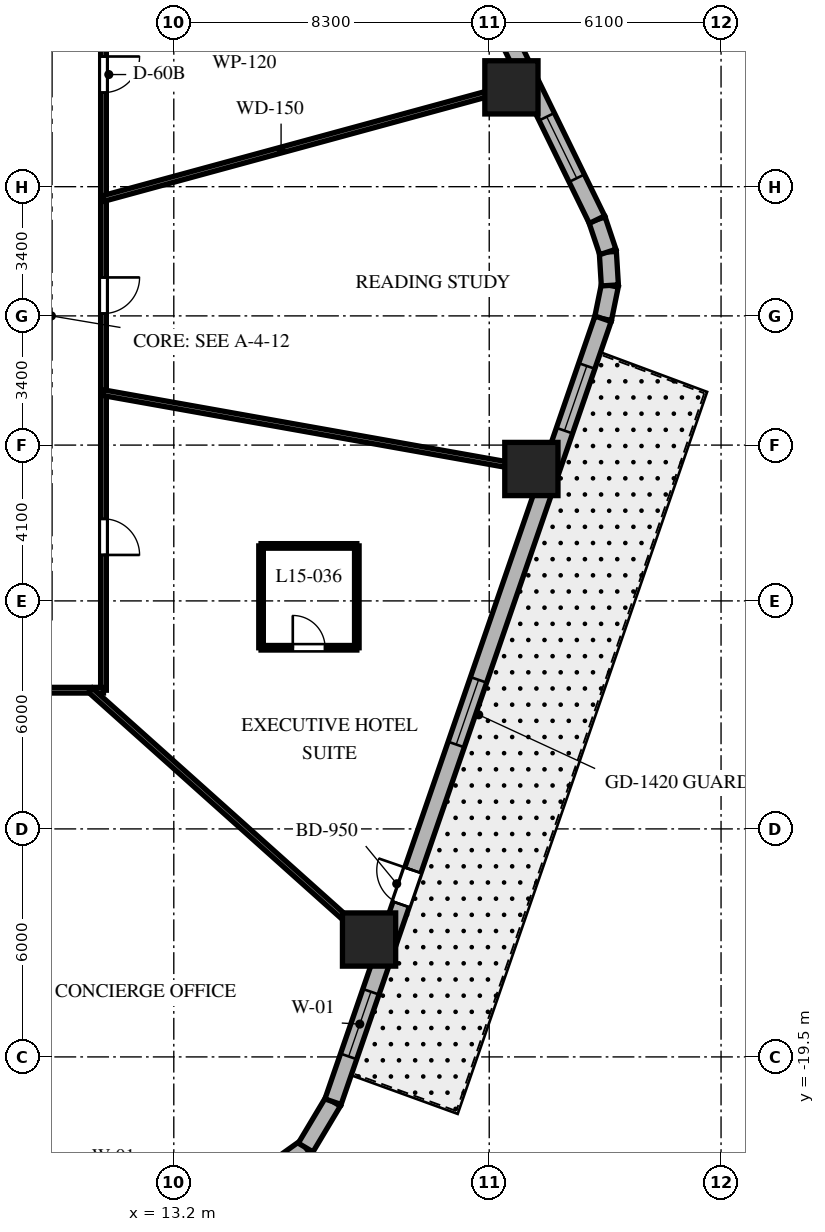
"""IFC4 building model, lengths in metres.
Left out: names, types, materials, properties, quantities, classifications, styles, units other than length and angle.
Written with IfcOpenShell. Run it as: python <this file> out.ifc"""

import sys

from ifc_helpers import new_model, si_unit, direction, frame, frame_2d, origin, origin_2d, place, context, subcontext, project, spatial, rectangle, extrude, element, fill, save


model = new_model("IFC4")
c1 = context("Model", 3, precision=1e-05, world=origin(), true_north=direction((0.0, 1.0)))
c2 = subcontext(c1, "Body", "Model", "MODEL_VIEW")
j1 = project(units=[si_unit("LENGTHUNIT", "METRE"), si_unit("PLANEANGLEUNIT", "RADIAN")], contexts=[c1])
p1 = place(None, origin())
s1 = spatial("IfcSite", under=j1, at=p1, CompositionType="ELEMENT")
p2 = place(p1, origin())
s2 = spatial("IfcBuilding", under=s1, at=p2, CompositionType="ELEMENT")
p3 = place(p2, frame((0.0, 0.0, 67.5)))
s3 = spatial("IfcBuildingStorey", under=s2, at=p3, CompositionType="ELEMENT", Elevation=67.5)
for number, where, z_axis, x_axis in (
    (1, (18.338, -16.411, 0.0), (0.0, 0.0, 1.0), (1.0, 0.0, 0.0)),
    (2, (22.609, -4.029, 0.0), (0.0, 0.0, 1.0), (1.0, 0.0, 0.0)),
    (3, (22.084, 6.014, 0.0), (0.0, 0.0, 1.0), (1.0, 0.0, 0.0)),
):
    element("IfcColumn", number, at=place(p3, frame(where, z_axis=z_axis, x_axis=x_axis)), inside=s3, PredefinedType="COLUMN", context=c2, shape_type="SweptSolid", body=[
        extrude(rectangle(XDim=1.4, YDim=1.4, at=origin_2d()), origin(), (0.0, 0.0, 1.0), 3.7),
    ])
p4 = place(p3, frame((15.544, -22.687, 0.0), z_axis=(0.0, 0.0, 1.0), x_axis=(0.814210854316, 0.580569276412, 0.0)))
e4 = element("IfcWall", 4, at=p4, inside=s3, PredefinedType="SOLIDWALL", context=c2, shape_type="SweptSolid", body=[
    extrude(rectangle(XDim=1.381, YDim=0.45, at=frame_2d((0.691, 0.0))), origin(), (0.0, 0.0, 1.0), 3.4),
])
p5 = place(p3, frame((16.669, -21.885, 0.0), z_axis=(0.0, 0.0, 1.0), x_axis=(0.512936712947, 0.858426425799, 0.0)))
e5 = element("IfcWall", 5, at=p5, inside=s3, PredefinedType="SOLIDWALL", context=c2, shape_type="SweptSolid", body=[
    extrude(rectangle(XDim=1.406, YDim=0.45, at=frame_2d((0.703, 0.0))), origin(), (0.0, 0.0, 1.0), 3.4),
])
p6 = place(p3, frame((24.496, -0.077, 0.0), z_axis=(0.0, 0.0, 1.0), x_axis=(0.199570594521, 0.979883451132, 0.0)))
e6 = element("IfcWall", 6, at=p6, inside=s3, PredefinedType="SOLIDWALL", context=c2, shape_type="SweptSolid", body=[
    extrude(rectangle(XDim=0.897, YDim=0.45, at=frame_2d((0.448, 0.0))), origin(), (0.0, 0.0, 1.0), 3.4),
])
p7 = place(p3, frame((24.675, 0.802, 0.0), z_axis=(0.0, 0.0, 1.0), x_axis=(-0.061188874166, 0.998126205286, 0.0)))
e7 = element("IfcWall", 7, at=p7, inside=s3, PredefinedType="SOLIDWALL", context=c2, shape_type="SweptSolid", body=[
    extrude(rectangle(XDim=0.882, YDim=0.45, at=frame_2d((0.441, 0.0))), origin(), (0.0, 0.0, 1.0), 3.4),
])
p8 = place(p3, frame((24.621, 1.682, 0.0), z_axis=(0.0, 0.0, 1.0), x_axis=(-0.317697451681, 0.948192137278, 0.0)))
e8 = element("IfcWall", 8, at=p8, inside=s3, PredefinedType="SOLIDWALL", context=c2, shape_type="SweptSolid", body=[
    extrude(rectangle(XDim=0.897, YDim=0.45, at=frame_2d((0.448, 0.0))), origin(), (0.0, 0.0, 1.0), 3.4),
])
p9 = place(p3, frame((17.39, -20.678, 0.0), z_axis=(0.0, 0.0, 1.0), x_axis=(0.326068018294, 0.945346310854, 0.0)))
e9 = element("IfcWall", 9, at=p9, inside=s3, PredefinedType="SOLIDWALL", context=c2, shape_type="SweptSolid", body=[
    extrude(rectangle(XDim=21.793, YDim=0.45, at=frame_2d((10.896, 0.0))), origin(), (0.0, 0.0, 1.0), 3.4),
])
p10 = place(p9, frame((5.493, 0.0, 0.0)))
e10 = element("IfcOpeningElement", 10, at=p10, cuts=e9, PredefinedType="OPENING", context=c2, shape_type="SweptSolid", body=[
    extrude(rectangle(XDim=0.95, YDim=2.15, at=frame_2d((0.475, 1.075))), frame((0.0, 0.235, 0.0), z_axis=(0.0, -1.0, 0.0), x_axis=(1.0, 0.0, 0.0)), (0.0, 0.0, 1.0), 0.47),
])
p11 = place(p9, frame((1.26, 0.0, 0.8)))
e11 = element("IfcOpeningElement", 11, at=p11, cuts=e9, PredefinedType="OPENING", context=c2, shape_type="SweptSolid", body=[
    extrude(rectangle(XDim=1.8, YDim=1.8, at=frame_2d((0.9, 0.9))), frame((0.0, 0.235, 0.0), z_axis=(0.0, -1.0, 0.0), x_axis=(1.0, 0.0, 0.0)), (0.0, 0.0, 1.0), 0.47),
])
p12 = place(p9, frame((9.943, 0.0, 0.8)))
e12 = element("IfcOpeningElement", 12, at=p12, cuts=e9, PredefinedType="OPENING", context=c2, shape_type="SweptSolid", body=[
    extrude(rectangle(XDim=1.8, YDim=1.8, at=frame_2d((0.9, 0.9))), frame((0.0, 0.235, 0.0), z_axis=(0.0, -1.0, 0.0), x_axis=(1.0, 0.0, 0.0)), (0.0, 0.0, 1.0), 0.47),
])
p13 = place(p9, frame((18.68, 0.0, 0.8)))
e13 = element("IfcOpeningElement", 13, at=p13, cuts=e9, PredefinedType="OPENING", context=c2, shape_type="SweptSolid", body=[
    extrude(rectangle(XDim=1.8, YDim=1.8, at=frame_2d((0.9, 0.9))), frame((0.0, 0.235, 0.0), z_axis=(0.0, -1.0, 0.0), x_axis=(1.0, 0.0, 0.0)), (0.0, 0.0, 1.0), 0.47),
])
p14 = place(p3, frame((24.336, 2.532, 0.0), z_axis=(0.0, 0.0, 1.0), x_axis=(-0.438931326393, 0.898520612291, 0.0)))
e14 = element("IfcWall", 14, at=p14, inside=s3, PredefinedType="SOLIDWALL", context=c2, shape_type="SweptSolid", body=[
    extrude(rectangle(XDim=20.623, YDim=0.45, at=frame_2d((10.312, 0.0))), origin(), (0.0, 0.0, 1.0), 3.4),
])
p15 = place(p14, frame((9.462, 0.0, 0.8)))
e15 = element("IfcOpeningElement", 15, at=p15, cuts=e14, PredefinedType="OPENING", context=c2, shape_type="SweptSolid", body=[
    extrude(rectangle(XDim=1.8, YDim=1.8, at=frame_2d((0.9, 0.9))), frame((0.0, 0.235, 0.0), z_axis=(0.0, -1.0, 0.0), x_axis=(1.0, 0.0, 0.0)), (0.0, 0.0, 1.0), 0.47),
])
p16 = place(p14, frame((17.66, 0.0, 0.8)))
e16 = element("IfcOpeningElement", 16, at=p16, cuts=e14, PredefinedType="OPENING", context=c2, shape_type="SweptSolid", body=[
    extrude(rectangle(XDim=1.8, YDim=1.8, at=frame_2d((0.9, 0.9))), frame((0.0, 0.235, 0.0), z_axis=(0.0, -1.0, 0.0), x_axis=(1.0, 0.0, 0.0)), (0.0, 0.0, 1.0), 0.47),
])
p17 = place(p14, frame((1.214, 0.0, 0.8)))
e17 = element("IfcOpeningElement", 17, at=p17, cuts=e14, PredefinedType="OPENING", context=c2, shape_type="SweptSolid", body=[
    extrude(rectangle(XDim=1.8, YDim=1.8, at=frame_2d((0.9, 0.9))), frame((0.0, 0.235, 0.0), z_axis=(0.0, -1.0, 0.0), x_axis=(1.0, 0.0, 0.0)), (0.0, 0.0, 1.0), 0.47),
])
p18 = place(p3, frame((11.35, 9.85, 0.0), z_axis=(0.0, 0.0, 1.0), x_axis=(0.0, -1.0, 0.0)))
e18 = element("IfcWall", 18, at=p18, inside=s3, PredefinedType="PARTITIONING", context=c2, shape_type="SweptSolid", body=[
    extrude(rectangle(XDim=19.7, YDim=0.15, at=frame_2d((9.85, 0.0))), origin(), (0.0, 0.0, 1.0), 2.84),
])
p19 = place(p18, frame((3.024, 0.0, 0.0)))
e19 = element("IfcOpeningElement", 19, at=p19, cuts=e18, PredefinedType="OPENING", context=c2, shape_type="SweptSolid", body=[
    extrude(rectangle(XDim=0.95, YDim=2.03, at=frame_2d((0.475, 1.015))), frame((0.0, 0.085, 0.0), z_axis=(0.0, -1.0, 0.0), x_axis=(1.0, 0.0, 0.0)), (0.0, 0.0, 1.0), 0.17),
])
p20 = place(p18, frame((15.191, 0.0, 0.0)))
e20 = element("IfcOpeningElement", 20, at=p20, cuts=e18, PredefinedType="OPENING", context=c2, shape_type="SweptSolid", body=[
    extrude(rectangle(XDim=0.95, YDim=2.03, at=frame_2d((0.475, 1.015))), frame((0.0, 0.085, 0.0), z_axis=(0.0, -1.0, 0.0), x_axis=(1.0, 0.0, 0.0)), (0.0, 0.0, 1.0), 0.17),
])
p21 = place(p18, frame((8.838, 0.0, 0.0)))
e21 = element("IfcOpeningElement", 21, at=p21, cuts=e18, PredefinedType="OPENING", context=c2, shape_type="SweptSolid", body=[
    extrude(rectangle(XDim=0.95, YDim=2.03, at=frame_2d((0.475, 1.015))), frame((0.0, 0.085, 0.0), z_axis=(0.0, -1.0, 0.0), x_axis=(1.0, 0.0, 0.0)), (0.0, 0.0, 1.0), 0.17),
])
p22 = place(p3, frame((11.35, -9.85, 0.0), z_axis=(0.0, 0.0, 1.0), x_axis=(-1.0, 0.0, 0.0)))
e22 = element("IfcWall", 22, at=p22, inside=s3, PredefinedType="PARTITIONING", context=c2, shape_type="SweptSolid", body=[
    extrude(rectangle(XDim=22.7, YDim=0.15, at=frame_2d((11.35, 0.0))), origin(), (0.0, 0.0, 1.0), 2.84),
])
p23 = place(p22, frame((18.436, 0.0, 0.0)))
e23 = element("IfcOpeningElement", 23, at=p23, cuts=e22, PredefinedType="OPENING", context=c2, shape_type="SweptSolid", body=[
    extrude(rectangle(XDim=0.95, YDim=2.03, at=frame_2d((0.475, 1.015))), frame((0.0, 0.085, 0.0), z_axis=(0.0, -1.0, 0.0), x_axis=(1.0, 0.0, 0.0)), (0.0, 0.0, 1.0), 0.17),
])
p24 = place(p22, frame((15.176, 0.0, 0.0)))
e24 = element("IfcOpeningElement", 24, at=p24, cuts=e22, PredefinedType="OPENING", context=c2, shape_type="SweptSolid", body=[
    extrude(rectangle(XDim=0.9, YDim=2.03, at=frame_2d((0.45, 1.015))), frame((0.0, 0.085, 0.0), z_axis=(0.0, -1.0, 0.0), x_axis=(1.0, 0.0, 0.0)), (0.0, 0.0, 1.0), 0.17),
])
p25 = place(p22, frame((10.444, 0.0, 0.0)))
e25 = element("IfcOpeningElement", 25, at=p25, cuts=e22, PredefinedType="OPENING", context=c2, shape_type="SweptSolid", body=[
    extrude(rectangle(XDim=0.95, YDim=2.03, at=frame_2d((0.475, 1.015))), frame((0.0, 0.085, 0.0), z_axis=(0.0, -1.0, 0.0), x_axis=(1.0, 0.0, 0.0)), (0.0, 0.0, 1.0), 0.17),
])
p26 = place(p22, frame((3.369, 0.0, 0.0)))
e26 = element("IfcOpeningElement", 26, at=p26, cuts=e22, PredefinedType="OPENING", context=c2, shape_type="SweptSolid", body=[
    extrude(rectangle(XDim=0.95, YDim=2.03, at=frame_2d((0.475, 1.015))), frame((0.0, 0.085, 0.0), z_axis=(0.0, -1.0, 0.0), x_axis=(1.0, 0.0, 0.0)), (0.0, 0.0, 1.0), 0.17),
])
p27 = place(p3, frame((11.35, 3.091, 0.0), z_axis=(0.0, 0.0, 1.0), x_axis=(0.964859685283, 0.262765651704, 0.0)))
e27 = element("IfcWall", 27, at=p27, inside=s3, PredefinedType="PARTITIONING", context=c2, shape_type="SweptSolid", body=[
    extrude(rectangle(XDim=11.629, YDim=0.15, at=frame_2d((5.814, 0.0))), origin(), (0.0, 0.0, 1.0), 2.54),
])
p28 = place(p3, frame((11.007, -9.85, 0.0), z_axis=(0.0, 0.0, 1.0), x_axis=(0.745177305978, -0.666866390407, 0.0)))
e28 = element("IfcWall", 28, at=p28, inside=s3, PredefinedType="PARTITIONING", context=c2, shape_type="SweptSolid", body=[
    extrude(rectangle(XDim=10.375, YDim=0.15, at=frame_2d((5.188, 0.0))), origin(), (0.0, 0.0, 1.0), 2.54),
])
p29 = place(p3, frame((11.35, -2.023, 0.0), z_axis=(0.0, 0.0, 1.0), x_axis=(0.984493741877, -0.17541970301, 0.0)))
e29 = element("IfcWall", 29, at=p29, inside=s3, PredefinedType="PARTITIONING", context=c2, shape_type="SweptSolid", body=[
    extrude(rectangle(XDim=11.937, YDim=0.15, at=frame_2d((5.969, 0.0))), origin(), (0.0, 0.0, 1.0), 2.54),
])
p30 = place(p3, frame((15.496, -8.733, 0.0), z_axis=(0.0, 0.0, 1.0), x_axis=(1.0, 0.0, 0.0)))
e30 = element("IfcWall", 30, at=p30, inside=s3, PredefinedType="PARTITIONING", context=c2, shape_type="SweptSolid", body=[
    extrude(rectangle(XDim=2.52, YDim=0.12, at=frame_2d((1.26, 0.0))), origin(), (0.0, 0.0, 1.0), 2.972),
])
p31 = place(p30, frame((0.835, 0.0, 0.0)))
e31 = element("IfcOpeningElement", 31, at=p31, cuts=e30, PredefinedType="OPENING", context=c2, shape_type="SweptSolid", body=[
    extrude(rectangle(XDim=0.85, YDim=2.03, at=frame_2d((0.425, 1.015))), frame((0.0, 0.07, 0.0), z_axis=(0.0, -1.0, 0.0), x_axis=(1.0, 0.0, 0.0)), (0.0, 0.0, 1.0), 0.14),
])
p32 = place(p3, frame((18.016, -8.733, 0.0), z_axis=(0.0, 0.0, 1.0), x_axis=(0.0, 1.0, 0.0)))
e32 = element("IfcWall", 32, at=p32, inside=s3, PredefinedType="PARTITIONING", context=c2, shape_type="SweptSolid", body=[
    extrude(rectangle(XDim=2.68, YDim=0.12, at=frame_2d((1.34, 0.0))), origin(), (0.0, 0.0, 1.0), 2.972),
])
p33 = place(p3, frame((18.016, -6.053, 0.0), z_axis=(0.0, 0.0, 1.0), x_axis=(-1.0, 0.0, 0.0)))
e33 = element("IfcWall", 33, at=p33, inside=s3, PredefinedType="PARTITIONING", context=c2, shape_type="SweptSolid", body=[
    extrude(rectangle(XDim=2.52, YDim=0.12, at=frame_2d((1.26, 0.0))), origin(), (0.0, 0.0, 1.0), 2.972),
])
p34 = place(p3, frame((15.496, -6.053, 0.0), z_axis=(0.0, 0.0, 1.0), x_axis=(0.0, -1.0, 0.0)))
e34 = element("IfcWall", 34, at=p34, inside=s3, PredefinedType="PARTITIONING", context=c2, shape_type="SweptSolid", body=[
    extrude(rectangle(XDim=2.68, YDim=0.12, at=frame_2d((1.34, 0.0))), origin(), (0.0, 0.0, 1.0), 3.4),
])
p35 = place(p10, origin())
e35 = element("IfcDoor", 35, at=p35, inside=s3, OperationType="SINGLE_SWING_RIGHT", PredefinedType="DOOR", context=c2, shape_type="SweptSolid", body=[
    extrude(rectangle(XDim=0.95, YDim=2.15, at=frame_2d((0.475, 1.075))), frame((0.0, 0.025, 0.0), z_axis=(0.0, -1.0, 0.0), x_axis=(1.0, 0.0, 0.0)), (0.0, 0.0, 1.0), 0.05),
])
fill(e10, e35)
p36 = place(p11, origin())
e36 = element("IfcWindow", 36, at=p36, inside=s3, PartitioningType="SINGLE_PANEL", PredefinedType="WINDOW", context=c2, shape_type="SweptSolid", body=[
    extrude(rectangle(XDim=1.8, YDim=1.8, at=frame_2d((0.9, 0.9))), frame((0.0, 0.03, 0.0), z_axis=(0.0, -1.0, 0.0), x_axis=(1.0, 0.0, 0.0)), (0.0, 0.0, 1.0), 0.06),
])
fill(e11, e36)
p37 = place(p12, origin())
e37 = element("IfcWindow", 37, at=p37, inside=s3, PartitioningType="SINGLE_PANEL", PredefinedType="WINDOW", context=c2, shape_type="SweptSolid", body=[
    extrude(rectangle(XDim=1.8, YDim=1.8, at=frame_2d((0.9, 0.9))), frame((0.0, 0.03, 0.0), z_axis=(0.0, -1.0, 0.0), x_axis=(1.0, 0.0, 0.0)), (0.0, 0.0, 1.0), 0.06),
])
fill(e12, e37)
p38 = place(p13, origin())
e38 = element("IfcWindow", 38, at=p38, inside=s3, PartitioningType="SINGLE_PANEL", PredefinedType="WINDOW", context=c2, shape_type="SweptSolid", body=[
    extrude(rectangle(XDim=1.8, YDim=1.8, at=frame_2d((0.9, 0.9))), frame((0.0, 0.03, 0.0), z_axis=(0.0, -1.0, 0.0), x_axis=(1.0, 0.0, 0.0)), (0.0, 0.0, 1.0), 0.06),
])
fill(e13, e38)
p39 = place(p17, origin())
e39 = element("IfcWindow", 39, at=p39, inside=s3, PartitioningType="SINGLE_PANEL", PredefinedType="WINDOW", context=c2, shape_type="SweptSolid", body=[
    extrude(rectangle(XDim=1.8, YDim=1.8, at=frame_2d((0.9, 0.9))), frame((0.0, 0.03, 0.0), z_axis=(0.0, -1.0, 0.0), x_axis=(1.0, 0.0, 0.0)), (0.0, 0.0, 1.0), 0.06),
])
fill(e17, e39)
p40 = place(p19, origin())
e40 = element("IfcDoor", 40, at=p40, inside=s3, OperationType="SINGLE_SWING_LEFT", PredefinedType="DOOR", context=c2, shape_type="SweptSolid", body=[
    extrude(rectangle(XDim=0.95, YDim=2.03, at=frame_2d((0.475, 1.015))), frame((0.0, 0.025, 0.0), z_axis=(0.0, -1.0, 0.0), x_axis=(1.0, 0.0, 0.0)), (0.0, 0.0, 1.0), 0.05),
])
fill(e19, e40)
p41 = place(p20, origin())
e41 = element("IfcDoor", 41, at=p41, inside=s3, OperationType="SINGLE_SWING_RIGHT", PredefinedType="DOOR", context=c2, shape_type="SweptSolid", body=[
    extrude(rectangle(XDim=0.95, YDim=2.03, at=frame_2d((0.475, 1.015))), frame((0.0, 0.025, 0.0), z_axis=(0.0, -1.0, 0.0), x_axis=(1.0, 0.0, 0.0)), (0.0, 0.0, 1.0), 0.05),
])
fill(e20, e41)
p42 = place(p31, origin())
e42 = element("IfcDoor", 42, at=p42, inside=s3, OperationType="SINGLE_SWING_LEFT", PredefinedType="DOOR", context=c2, shape_type="SweptSolid", body=[
    extrude(rectangle(XDim=0.85, YDim=2.03, at=frame_2d((0.425, 1.015))), frame((0.0, 0.025, 0.0), z_axis=(0.0, -1.0, 0.0), x_axis=(1.0, 0.0, 0.0)), (0.0, 0.0, 1.0), 0.05),
])
fill(e31, e42)
p43 = place(p21, origin())
e43 = element("IfcDoor", 43, at=p43, inside=s3, OperationType="SINGLE_SWING_LEFT", PredefinedType="DOOR", context=c2, shape_type="SweptSolid", body=[
    extrude(rectangle(XDim=0.95, YDim=2.03, at=frame_2d((0.475, 1.015))), frame((0.0, 0.025, 0.0), z_axis=(0.0, -1.0, 0.0), x_axis=(1.0, 0.0, 0.0)), (0.0, 0.0, 1.0), 0.05),
])
fill(e21, e43)
save(model, sys.argv[1])
